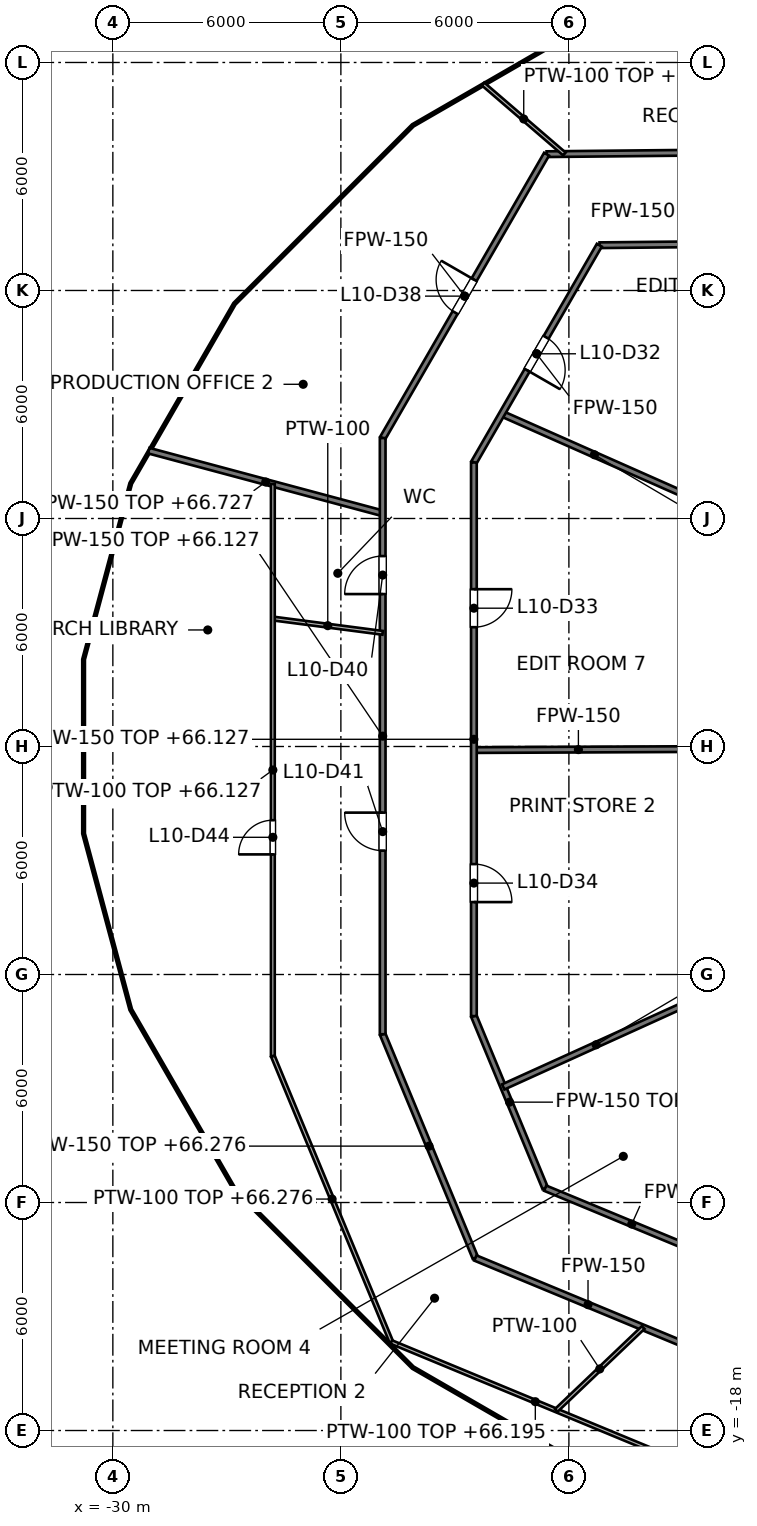
"""IFC4 building model, lengths in metres.
Left out: names, types, materials, properties, quantities, classifications, styles, units other than length and angle.
Written with IfcOpenShell. Run it as: python <this file> out.ifc"""

import sys

from ifc_helpers import new_model, si_unit, direction, frame, frame_2d, origin, place, context, subcontext, project, spatial, rectangle, extrude, element, fill, save


model = new_model("IFC4")
c1 = context("Model", 3, precision=1e-05, world=origin(), true_north=direction((0.0, 1.0)))
c2 = subcontext(c1, "Body", "Model", "MODEL_VIEW")
j1 = project(units=[si_unit("LENGTHUNIT", "METRE"), si_unit("PLANEANGLEUNIT", "RADIAN")], contexts=[c1])
p1 = place(None, origin())
s1 = spatial("IfcSite", under=j1, at=p1, CompositionType="ELEMENT")
p2 = place(p1, origin())
s2 = spatial("IfcBuilding", under=s1, at=p2, CompositionType="ELEMENT")
p3 = place(p2, frame((0.0, 0.0, 63.0)))
s3 = spatial("IfcBuildingStorey", under=s2, at=p3, CompositionType="ELEMENT", Elevation=63.0)
p4 = place(p3, frame((-22.9, -7.572, 0.0), z_axis=(0.0, 0.0, 1.0), x_axis=(0.382860357704, -0.923806227788, 0.0)))
e1 = element("IfcWall", 1, at=p4, inside=s3, PredefinedType="PARTITIONING", context=c2, shape_type="SweptSolid", body=[
    extrude(rectangle(XDim=6.374, YDim=0.15, at=frame_2d((3.187, 0.0))), origin(), (0.0, 0.0, 1.0), 3.276),
])
p5 = place(p3, frame((-20.5, -7.095, 0.0), z_axis=(0.0, 0.0, 1.0), x_axis=(0.382878184095, -0.923798839653, 0.0)))
e2 = element("IfcWall", 2, at=p5, inside=s3, PredefinedType="PARTITIONING", context=c2, shape_type="SweptSolid", body=[
    extrude(rectangle(XDim=4.902, YDim=0.15, at=frame_2d((2.451, 0.0))), origin(), (0.0, 0.0, 1.0), 3.276),
])
p6 = place(p3, frame((-19.76, 8.755, 0.0), z_axis=(0.0, 0.0, 1.0), x_axis=(0.91424834547, -0.405154245695, 0.0)))
e3 = element("IfcWall", 3, at=p6, inside=s3, PredefinedType="PARTITIONING", context=c2, shape_type="SweptSolid", body=[
    extrude(rectangle(XDim=5.318, YDim=0.15, at=frame_2d((2.659, 0.0))), origin(), (0.0, 0.0, 1.0), 3.276),
])
p7 = place(p3, frame((-20.46, -13.46, 0.0), z_axis=(0.0, 0.0, 1.0), x_axis=(0.923801547606, -0.382871650349, 0.0)))
e4 = element("IfcWall", 4, at=p7, inside=s3, PredefinedType="PARTITIONING", context=c2, shape_type="SweptSolid", body=[
    extrude(rectangle(XDim=6.415, YDim=0.15, at=frame_2d((3.208, 0.0))), origin(), (0.0, 0.0, 1.0), 3.195),
])
p8 = place(p3, frame((-18.623, -11.623, 0.0), z_axis=(0.0, 0.0, 1.0), x_axis=(0.923816441303, -0.382835712518, 0.0)))
e5 = element("IfcWall", 5, at=p8, inside=s3, PredefinedType="PARTITIONING", context=c2, shape_type="SweptSolid", body=[
    extrude(rectangle(XDim=4.931, YDim=0.15, at=frame_2d((2.465, 0.0))), origin(), (0.0, 0.0, 1.0), 3.195),
])
p9 = place(p3, frame((-29.055, 7.785, 0.0), z_axis=(0.0, 0.0, 1.0), x_axis=(0.965937962099, -0.258773749396, 0.0)))
e6 = element("IfcWall", 6, at=p9, inside=s3, PredefinedType="PARTITIONING", context=c2, shape_type="SweptSolid", body=[
    extrude(rectangle(XDim=6.372, YDim=0.15, at=frame_2d((3.186, 0.0))), origin(), (0.0, 0.0, 1.0), 3.727),
])
p10 = place(p3, frame((-20.5, -0.094, 0.0), z_axis=(0.0, 0.0, 1.0), x_axis=(0.999990148138, 0.004438876723, 0.0)))
e7 = element("IfcWall", 7, at=p10, inside=s3, PredefinedType="PARTITIONING", context=c2, shape_type="SweptSolid", body=[
    extrude(rectangle(XDim=5.5, YDim=0.15, at=frame_2d((2.75, 0.0))), origin(), (0.0, 0.0, 1.0), 3.195),
])
p11 = place(p3, frame((-17.194, 13.191, 0.0), z_axis=(0.0, 0.0, 1.0), x_axis=(0.999950394899, 0.009960308291, 0.0)))
e8 = element("IfcWall", 8, at=p11, inside=s3, PredefinedType="PARTITIONING", context=c2, shape_type="SweptSolid", body=[
    extrude(rectangle(XDim=5.294, YDim=0.15, at=frame_2d((2.647, 0.0))), origin(), (0.0, 0.0, 1.0), 3.276),
])
p12 = place(p3, frame((-18.587, 15.587, 0.0), z_axis=(0.0, 0.0, 1.0), x_axis=(0.99995065417, 0.009934245078, 0.0)))
e9 = element("IfcWall", 9, at=p12, inside=s3, PredefinedType="PARTITIONING", context=c2, shape_type="SweptSolid", body=[
    extrude(rectangle(XDim=33.669, YDim=0.15, at=frame_2d((16.834, 0.0))), origin(), (0.0, 0.0, 1.0), 3.127),
])
p13 = place(p12, frame((18.716, 0.0, 0.0)))
e10 = element("IfcOpeningElement", 10, at=p13, cuts=e9, PredefinedType="OPENING", context=c2, shape_type="SweptSolid", body=[
    extrude(rectangle(XDim=1.0, YDim=2.1, at=frame_2d((0.5, 1.05))), frame((0.0, 0.075, 0.0), z_axis=(0.0, -1.0, 0.0), x_axis=(1.0, 0.0, 0.0)), (0.0, 0.0, 1.0), 0.15),
])
p14 = place(p12, frame((8.228, 0.0, 0.0)))
e11 = element("IfcOpeningElement", 11, at=p14, cuts=e9, PredefinedType="OPENING", context=c2, shape_type="SweptSolid", body=[
    extrude(rectangle(XDim=1.0, YDim=2.1, at=frame_2d((0.5, 1.05))), frame((0.0, 0.075, 0.0), z_axis=(0.0, -1.0, 0.0), x_axis=(1.0, 0.0, 0.0)), (0.0, 0.0, 1.0), 0.15),
])
p15 = place(p12, frame((29.768, 0.0, 0.0)))
e12 = element("IfcOpeningElement", 12, at=p15, cuts=e9, PredefinedType="OPENING", context=c2, shape_type="SweptSolid", body=[
    extrude(rectangle(XDim=1.0, YDim=2.1, at=frame_2d((0.5, 1.05))), frame((0.0, 0.075, 0.0), z_axis=(0.0, -1.0, 0.0), x_axis=(1.0, 0.0, 0.0)), (0.0, 0.0, 1.0), 0.15),
])
p16 = place(p12, frame((24.449, 0.0, 0.0)))
e13 = element("IfcOpeningElement", 13, at=p16, cuts=e9, PredefinedType="OPENING", context=c2, shape_type="SweptSolid", body=[
    extrude(rectangle(XDim=1.0, YDim=2.1, at=frame_2d((0.5, 1.05))), frame((0.0, 0.075, 0.0), z_axis=(0.0, -1.0, 0.0), x_axis=(1.0, 0.0, 0.0)), (0.0, 0.0, 1.0), 0.15),
])
p17 = place(p3, frame((-19.728, -8.958, 0.0), z_axis=(0.0, 0.0, 1.0), x_axis=(0.910629511797, 0.413223779863, 0.0)))
e14 = element("IfcWall", 14, at=p17, inside=s3, PredefinedType="PARTITIONING", context=c2, shape_type="SweptSolid", body=[
    extrude(rectangle(XDim=5.368, YDim=0.15, at=frame_2d((2.684, 0.0))), origin(), (0.0, 0.0, 1.0), 4.05),
])
p18 = place(p3, frame((-20.5, 7.474, 0.0), z_axis=(0.0, 0.0, 1.0), x_axis=(0.500012665616, 0.866018091164, 0.0)))
e15 = element("IfcWall", 15, at=p18, inside=s3, PredefinedType="PARTITIONING", context=c2, shape_type="SweptSolid", body=[
    extrude(rectangle(XDim=6.602, YDim=0.15, at=frame_2d((3.301, 0.0))), origin(), (0.0, 0.0, 1.0), 3.195),
])
p19 = place(p18, frame((2.803, 0.0, 0.0)))
e16 = element("IfcOpeningElement", 16, at=p19, cuts=e15, PredefinedType="OPENING", context=c2, shape_type="SweptSolid", body=[
    extrude(rectangle(XDim=1.0, YDim=2.1, at=frame_2d((0.5, 1.05))), frame((0.0, 0.075, 0.0), z_axis=(0.0, -1.0, 0.0), x_axis=(1.0, 0.0, 0.0)), (0.0, 0.0, 1.0), 0.15),
])
p20 = place(p3, frame((-22.9, 8.117, 0.0), z_axis=(0.0, 0.0, 1.0), x_axis=(0.499983791763, 0.866034761412, 0.0)))
e17 = element("IfcWall", 17, at=p20, inside=s3, PredefinedType="PARTITIONING", context=c2, shape_type="SweptSolid", body=[
    extrude(rectangle(XDim=8.626, YDim=0.15, at=frame_2d((4.313, 0.0))), origin(), (0.0, 0.0, 1.0), 3.195),
])
p21 = place(p20, frame((3.812, 0.0, 0.0)))
e18 = element("IfcOpeningElement", 18, at=p21, cuts=e17, PredefinedType="OPENING", context=c2, shape_type="SweptSolid", body=[
    extrude(rectangle(XDim=1.0, YDim=2.1, at=frame_2d((0.5, 1.05))), frame((0.0, 0.075, 0.0), z_axis=(0.0, -1.0, 0.0), x_axis=(1.0, 0.0, 0.0)), (0.0, 0.0, 1.0), 0.15),
])
p22 = place(p3, frame((-20.5, -7.095, 0.0), z_axis=(0.0, 0.0, 1.0), x_axis=(0.0, 1.0, 0.0)))
e19 = element("IfcWall", 19, at=p22, inside=s3, PredefinedType="PARTITIONING", context=c2, shape_type="SweptSolid", body=[
    extrude(rectangle(XDim=14.569, YDim=0.15, at=frame_2d((7.285, 0.0))), origin(), (0.0, 0.0, 1.0), 3.127),
])
p23 = place(p22, frame((10.234, 0.0, 0.0)))
e20 = element("IfcOpeningElement", 20, at=p23, cuts=e19, PredefinedType="OPENING", context=c2, shape_type="SweptSolid", body=[
    extrude(rectangle(XDim=1.0, YDim=2.1, at=frame_2d((0.5, 1.05))), frame((0.0, 0.075, 0.0), z_axis=(0.0, -1.0, 0.0), x_axis=(1.0, 0.0, 0.0)), (0.0, 0.0, 1.0), 0.15),
])
p24 = place(p22, frame((3.0, 0.0, 0.0)))
e21 = element("IfcOpeningElement", 21, at=p24, cuts=e19, PredefinedType="OPENING", context=c2, shape_type="SweptSolid", body=[
    extrude(rectangle(XDim=1.0, YDim=2.1, at=frame_2d((0.5, 1.05))), frame((0.0, 0.075, 0.0), z_axis=(0.0, -1.0, 0.0), x_axis=(1.0, 0.0, 0.0)), (0.0, 0.0, 1.0), 0.15),
])
p25 = place(p3, frame((-22.9, -7.572, 0.0), z_axis=(0.0, 0.0, 1.0), x_axis=(0.0, 1.0, 0.0)))
e22 = element("IfcWall", 22, at=p25, inside=s3, PredefinedType="PARTITIONING", context=c2, shape_type="SweptSolid", body=[
    extrude(rectangle(XDim=15.689, YDim=0.15, at=frame_2d((7.844, 0.0))), origin(), (0.0, 0.0, 1.0), 3.127),
])
p26 = place(p25, frame((11.583, 0.0, 0.0)))
e23 = element("IfcOpeningElement", 23, at=p26, cuts=e22, PredefinedType="OPENING", context=c2, shape_type="SweptSolid", body=[
    extrude(rectangle(XDim=1.0, YDim=2.1, at=frame_2d((0.5, 1.05))), frame((0.0, 0.075, 0.0), z_axis=(0.0, -1.0, 0.0), x_axis=(1.0, 0.0, 0.0)), (0.0, 0.0, 1.0), 0.15),
])
p27 = place(p25, frame((4.832, 0.0, 0.0)))
e24 = element("IfcOpeningElement", 24, at=p27, cuts=e22, PredefinedType="OPENING", context=c2, shape_type="SweptSolid", body=[
    extrude(rectangle(XDim=1.0, YDim=2.1, at=frame_2d((0.5, 1.05))), frame((0.0, 0.075, 0.0), z_axis=(0.0, -1.0, 0.0), x_axis=(1.0, 0.0, 0.0)), (0.0, 0.0, 1.0), 0.15),
])
p28 = place(p3, frame((-25.79, -8.147, 0.0), z_axis=(0.0, 0.0, 1.0), x_axis=(0.382777969207, -0.923840368402, 0.0)))
e25 = element("IfcWall", 25, at=p28, inside=s3, PredefinedType="PARTITIONING", context=c2, shape_type="SweptSolid", body=[
    extrude(rectangle(XDim=8.146, YDim=0.1, at=frame_2d((4.073, 0.0))), origin(), (0.0, 0.0, 1.0), 3.276),
])
p29 = place(p3, frame((-20.259, 17.434, 0.0), z_axis=(0.0, 0.0, 1.0), x_axis=(0.758065533123, -0.65217838625, 0.0)))
e26 = element("IfcWall", 26, at=p29, inside=s3, PredefinedType="PARTITIONING", context=c2, shape_type="SweptSolid", body=[
    extrude(rectangle(XDim=2.824, YDim=0.1, at=frame_2d((1.412, 0.0))), origin(), (0.0, 0.0, 1.0), 3.573),
])
p30 = place(p3, frame((-22.672, -15.672, 0.0), z_axis=(0.0, 0.0, 1.0), x_axis=(0.923807088213, -0.382858281572, 0.0)))
e27 = element("IfcWall", 27, at=p30, inside=s3, PredefinedType="PARTITIONING", context=c2, shape_type="SweptSolid", body=[
    extrude(rectangle(XDim=8.202, YDim=0.1, at=frame_2d((4.101, 0.0))), origin(), (0.0, 0.0, 1.0), 3.195),
])
p31 = place(p3, frame((-25.79, 3.368, 0.0), z_axis=(0.0, 0.0, 1.0), x_axis=(0.991601345334, -0.129332022064, 0.0)))
e28 = element("IfcWall", 28, at=p31, inside=s3, PredefinedType="PARTITIONING", context=c2, shape_type="SweptSolid", body=[
    extrude(rectangle(XDim=2.915, YDim=0.1, at=frame_2d((1.457, 0.0))), origin(), (0.0, 0.0, 1.0), 4.05),
])
p32 = place(p3, frame((-18.332, -17.47, 0.0), z_axis=(0.0, 0.0, 1.0), x_axis=(0.72386407588, 0.689942606056, 0.0)))
e29 = element("IfcWall", 29, at=p32, inside=s3, PredefinedType="PARTITIONING", context=c2, shape_type="SweptSolid", body=[
    extrude(rectangle(XDim=3.16, YDim=0.1, at=frame_2d((1.58, 0.0))), origin(), (0.0, 0.0, 1.0), 4.05),
])
p33 = place(p3, frame((-25.79, -8.147, 0.0), z_axis=(0.0, 0.0, 1.0), x_axis=(0.0, 1.0, 0.0)))
e30 = element("IfcWall", 30, at=p33, inside=s3, PredefinedType="PARTITIONING", context=c2, shape_type="SweptSolid", body=[
    extrude(rectangle(XDim=15.057, YDim=0.1, at=frame_2d((7.528, 0.0))), origin(), (0.0, 0.0, 1.0), 3.127),
])
p34 = place(p33, frame((5.308, 0.0, 0.0)))
e31 = element("IfcOpeningElement", 31, at=p34, cuts=e30, PredefinedType="OPENING", context=c2, shape_type="SweptSolid", body=[
    extrude(rectangle(XDim=0.9, YDim=2.1, at=frame_2d((0.45, 1.05))), frame((0.0, 0.05, 0.0), z_axis=(0.0, -1.0, 0.0), x_axis=(1.0, 0.0, 0.0)), (0.0, 0.0, 1.0), 0.1),
])
p35 = place(p19, origin())
e32 = element("IfcDoor", 32, at=p35, inside=s3, OperationType="SINGLE_SWING_LEFT", PredefinedType="DOOR", context=c2, shape_type="SweptSolid", body=[
    extrude(rectangle(XDim=1.0, YDim=2.1, at=frame_2d((0.5, 1.05))), frame((0.0, 0.025, 0.0), z_axis=(0.0, -1.0, 0.0), x_axis=(1.0, 0.0, 0.0)), (0.0, 0.0, 1.0), 0.05),
])
fill(e16, e32)
p36 = place(p23, origin())
e33 = element("IfcDoor", 33, at=p36, inside=s3, OperationType="SINGLE_SWING_RIGHT", PredefinedType="DOOR", context=c2, shape_type="SweptSolid", body=[
    extrude(rectangle(XDim=1.0, YDim=2.1, at=frame_2d((0.5, 1.05))), frame((0.0, 0.025, 0.0), z_axis=(0.0, -1.0, 0.0), x_axis=(1.0, 0.0, 0.0)), (0.0, 0.0, 1.0), 0.05),
])
fill(e20, e33)
p37 = place(p24, origin())
e34 = element("IfcDoor", 34, at=p37, inside=s3, OperationType="SINGLE_SWING_LEFT", PredefinedType="DOOR", context=c2, shape_type="SweptSolid", body=[
    extrude(rectangle(XDim=1.0, YDim=2.1, at=frame_2d((0.5, 1.05))), frame((0.0, 0.025, 0.0), z_axis=(0.0, -1.0, 0.0), x_axis=(1.0, 0.0, 0.0)), (0.0, 0.0, 1.0), 0.05),
])
fill(e21, e34)
p38 = place(p21, origin())
e35 = element("IfcDoor", 35, at=p38, inside=s3, OperationType="SINGLE_SWING_RIGHT", PredefinedType="DOOR", context=c2, shape_type="SweptSolid", body=[
    extrude(rectangle(XDim=1.0, YDim=2.1, at=frame_2d((0.5, 1.05))), frame((0.0, 0.025, 0.0), z_axis=(0.0, -1.0, 0.0), x_axis=(1.0, 0.0, 0.0)), (0.0, 0.0, 1.0), 0.05),
])
fill(e18, e35)
p39 = place(p26, origin())
e36 = element("IfcDoor", 36, at=p39, inside=s3, OperationType="SINGLE_SWING_LEFT", PredefinedType="DOOR", context=c2, shape_type="SweptSolid", body=[
    extrude(rectangle(XDim=1.0, YDim=2.1, at=frame_2d((0.5, 1.05))), frame((0.0, 0.025, 0.0), z_axis=(0.0, -1.0, 0.0), x_axis=(1.0, 0.0, 0.0)), (0.0, 0.0, 1.0), 0.05),
])
fill(e23, e36)
p40 = place(p27, origin())
e37 = element("IfcDoor", 37, at=p40, inside=s3, OperationType="SINGLE_SWING_RIGHT", PredefinedType="DOOR", context=c2, shape_type="SweptSolid", body=[
    extrude(rectangle(XDim=1.0, YDim=2.1, at=frame_2d((0.5, 1.05))), frame((0.0, 0.025, 0.0), z_axis=(0.0, -1.0, 0.0), x_axis=(1.0, 0.0, 0.0)), (0.0, 0.0, 1.0), 0.05),
])
fill(e24, e37)
p41 = place(p34, origin())
e38 = element("IfcDoor", 38, at=p41, inside=s3, OperationType="SINGLE_SWING_LEFT", PredefinedType="DOOR", context=c2, shape_type="SweptSolid", body=[
    extrude(rectangle(XDim=0.9, YDim=2.1, at=frame_2d((0.45, 1.05))), frame((0.0, 0.025, 0.0), z_axis=(0.0, -1.0, 0.0), x_axis=(1.0, 0.0, 0.0)), (0.0, 0.0, 1.0), 0.05),
])
fill(e31, e38)
save(model, sys.argv[1])
